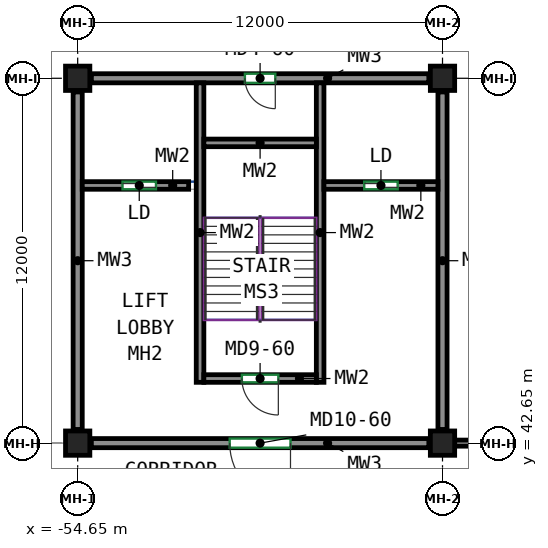
"""IFC4 building model, lengths in metres.
Left out: names, types, materials, properties, quantities, classifications, styles, units other than length and angle.
Written with IfcOpenShell. Run it as: python <this file> out.ifc"""

import sys

from ifc_helpers import new_model, si_unit, direction, frame, frame_2d, origin, origin_2d, place, context, subcontext, project, spatial, rectangle, extrude, source, transform, mapped, element, fill, save


model = new_model("IFC4")
c1 = context("Model", 3, precision=1e-05, world=origin(), true_north=direction((0.0, 1.0)))
c2 = subcontext(c1, "Body", "Model", "MODEL_VIEW")
j1 = project(units=[si_unit("LENGTHUNIT", "METRE"), si_unit("PLANEANGLEUNIT", "RADIAN")], contexts=[c1])
p1 = place(None, origin())
s1 = spatial("IfcSite", under=j1, at=p1, CompositionType="ELEMENT")
p2 = place(p1, origin())
s2 = spatial("IfcBuilding", under=s1, at=p2, CompositionType="ELEMENT")
p3 = place(p2, frame((0.0, 0.0, 9.0)))
s3 = spatial("IfcBuildingStorey", under=s2, at=p3, CompositionType="ELEMENT", Elevation=9.0)
m1 = source(origin(), c2, "Body", "SweptSolid", [
    extrude(rectangle(XDim=0.8, YDim=0.8, at=origin_2d()), origin(), (0.0, 0.0, 1.0), 4.1),
])
for number, where, z_axis, x_axis in (
    (1, (-54.65, 42.65, 0.0), (0.0, 0.0, 1.0), (1.0, 0.0, 0.0)),
    (2, (-54.65, 54.65, 0.0), (0.0, 0.0, 1.0), (1.0, 0.0, 0.0)),
    (3, (-42.65, 42.65, 0.0), (0.0, 0.0, 1.0), (1.0, 0.0, 0.0)),
    (4, (-42.65, 54.65, 0.0), (0.0, 0.0, 1.0), (1.0, 0.0, 0.0)),
):
    element("IfcColumn", number, at=place(p3, frame(where, z_axis=z_axis, x_axis=x_axis)), inside=s3, PredefinedType="COLUMN", context=c2, shape_type="MappedRepresentation", body=[
        mapped(m1, transform((0.0, 0.0, 0.0))),
    ])
m2 = source(origin(), c2, "Body", "SweptSolid", [
    extrude(rectangle(XDim=11.1, YDim=0.3, at=frame_2d((5.55, 0.0))), origin(), (0.0, 0.0, 1.0), 3.2),
])
p4 = place(p3, frame((-43.1, 54.65, 0.0), z_axis=(0.0, 0.0, 1.0), x_axis=(-1.0, 0.0, 0.0)))
e5 = element("IfcWall", 5, at=p4, inside=s3, PredefinedType="SHEAR", context=c2, shape_type="MappedRepresentation", body=[
    mapped(m2, transform((0.0, 0.0, 0.0))),
])
p5 = place(p4, frame((5.05, 0.0, 0.0)))
e6 = element("IfcOpeningElement", 6, at=p5, cuts=e5, PredefinedType="OPENING", context=c2, shape_type="SweptSolid", body=[
    extrude(rectangle(XDim=1.0, YDim=2.1, at=frame_2d((0.5, 1.05))), frame((0.0, 0.16, 0.0), z_axis=(0.0, -1.0, 0.0), x_axis=(1.0, 0.0, 0.0)), (0.0, 0.0, 1.0), 0.32),
])
p6 = place(p3, frame((-43.1, 42.65, 0.0), z_axis=(0.0, 0.0, 1.0), x_axis=(-1.0, 0.0, 0.0)))
e7 = element("IfcWall", 7, at=p6, inside=s3, PredefinedType="SHEAR", context=c2, shape_type="MappedRepresentation", body=[
    mapped(m2, transform((0.0, 0.0, 0.0))),
])
p7 = place(p6, frame((4.55, 0.0, 0.0)))
e8 = element("IfcOpeningElement", 8, at=p7, cuts=e7, PredefinedType="OPENING", context=c2, shape_type="SweptSolid", body=[
    extrude(rectangle(XDim=2.0, YDim=2.4, at=frame_2d((1.0, 1.2))), frame((0.0, 0.16, 0.0), z_axis=(0.0, -1.0, 0.0), x_axis=(1.0, 0.0, 0.0)), (0.0, 0.0, 1.0), 0.32),
])
for number, where, z_axis, x_axis in (
    (9, (-42.65, 54.2, 0.0), (0.0, 0.0, 1.0), (0.0, -1.0, 0.0)),
    (10, (-54.65, 54.2, 0.0), (0.0, 0.0, 1.0), (0.0, -1.0, 0.0)),
):
    element("IfcWall", number, at=place(p3, frame(where, z_axis=z_axis, x_axis=x_axis)), inside=s3, PredefinedType="SHEAR", context=c2, shape_type="MappedRepresentation", body=[
        mapped(m2, transform((0.0, 0.0, 0.0))),
    ])
m3 = source(origin(), c2, "Body", "SweptSolid", [
    extrude(rectangle(XDim=9.85, YDim=0.25, at=frame_2d((4.925, 0.0))), origin(), (0.0, 0.0, 1.0), 4.1),
])
for number, where, z_axis, x_axis in (
    (11, (-46.675, 54.5, 0.0), (0.0, 0.0, 1.0), (0.0, -1.0, 0.0)),
    (12, (-50.625, 54.5, 0.0), (0.0, 0.0, 1.0), (0.0, -1.0, 0.0)),
):
    element("IfcWall", number, at=place(p3, frame(where, z_axis=z_axis, x_axis=x_axis)), inside=s3, PredefinedType="SHEAR", context=c2, shape_type="MappedRepresentation", body=[
        mapped(m3, transform((0.0, 0.0, 0.0))),
    ])
m4 = source(origin(), c2, "Body", "SweptSolid", [
    extrude(rectangle(XDim=3.7, YDim=0.25, at=frame_2d((1.85, 0.0))), origin(), (0.0, 0.0, 1.0), 4.1),
])
p8 = place(p3, frame((-46.8, 52.525, 0.0), z_axis=(0.0, 0.0, 1.0), x_axis=(-1.0, 0.0, 0.0)))
e13 = element("IfcWall", 13, at=p8, inside=s3, PredefinedType="SHEAR", context=c2, shape_type="MappedRepresentation", body=[
    mapped(m4, transform((0.0, 0.0, 0.0))),
])
p9 = place(p3, frame((-46.8, 44.775, 0.0), z_axis=(0.0, 0.0, 1.0), x_axis=(-1.0, 0.0, 0.0)))
e14 = element("IfcWall", 14, at=p9, inside=s3, PredefinedType="SHEAR", context=c2, shape_type="MappedRepresentation", body=[
    mapped(m4, transform((0.0, 0.0, 0.0))),
])
p10 = place(p9, frame((1.25, 0.0, 0.0)))
e15 = element("IfcOpeningElement", 15, at=p10, cuts=e14, PredefinedType="OPENING", context=c2, shape_type="SweptSolid", body=[
    extrude(rectangle(XDim=1.2, YDim=2.1, at=frame_2d((0.6, 1.05))), frame((0.0, 0.135, 0.0), z_axis=(0.0, -1.0, 0.0), x_axis=(1.0, 0.0, 0.0)), (0.0, 0.0, 1.0), 0.27),
])
m5 = source(origin(), c2, "Body", "SweptSolid", [
    extrude(rectangle(XDim=3.75, YDim=0.25, at=frame_2d((1.875, 0.0))), origin(), (0.0, 0.0, 1.0), 4.1),
])
p11 = place(p3, frame((-42.8, 51.125, 0.0), z_axis=(0.0, 0.0, 1.0), x_axis=(-1.0, 0.0, 0.0)))
e16 = element("IfcWall", 16, at=p11, inside=s3, PredefinedType="SHEAR", context=c2, shape_type="MappedRepresentation", body=[
    mapped(m5, transform((0.0, 0.0, 0.0))),
])
p12 = place(p11, frame((1.325, 0.0, 0.0)))
e17 = element("IfcOpeningElement", 17, at=p12, cuts=e16, PredefinedType="OPENING", context=c2, shape_type="SweptSolid", body=[
    extrude(rectangle(XDim=1.1, YDim=2.1, at=frame_2d((0.55, 1.05))), frame((0.0, 0.135, 0.0), z_axis=(0.0, -1.0, 0.0), x_axis=(1.0, 0.0, 0.0)), (0.0, 0.0, 1.0), 0.27),
])
m6 = source(origin(), c2, "Body", "SweptSolid", [
    extrude(rectangle(XDim=3.5, YDim=0.25, at=frame_2d((1.75, 0.0))), origin(), (0.0, 0.0, 1.0), 4.1),
])
p13 = place(p3, frame((-51.0, 51.125, 0.0), z_axis=(0.0, 0.0, 1.0), x_axis=(-1.0, 0.0, 0.0)))
e18 = element("IfcWall", 18, at=p13, inside=s3, PredefinedType="SHEAR", context=c2, shape_type="MappedRepresentation", body=[
    mapped(m6, transform((0.0, 0.0, 0.0))),
])
p14 = place(p13, frame((1.075, 0.0, 0.0)))
e19 = element("IfcOpeningElement", 19, at=p14, cuts=e18, PredefinedType="OPENING", context=c2, shape_type="SweptSolid", body=[
    extrude(rectangle(XDim=1.1, YDim=2.1, at=frame_2d((0.55, 1.05))), frame((0.0, 0.135, 0.0), z_axis=(0.0, -1.0, 0.0), x_axis=(1.0, 0.0, 0.0)), (0.0, 0.0, 1.0), 0.27),
])
m7 = source(origin(), c2, "Body", "SweptSolid", [
    extrude(rectangle(XDim=1.8, YDim=0.2, at=frame_2d((0.9, 0.0))), origin(), (0.0, 0.0, 1.0), 4.1),
])
p15 = place(p3, frame((-56.85, 42.65, 0.0), z_axis=(0.0, 0.0, 1.0), x_axis=(1.0, 0.0, 0.0)))
e20 = element("IfcWall", 20, at=p15, inside=s3, PredefinedType="PARTITIONING", context=c2, shape_type="MappedRepresentation", body=[
    mapped(m7, transform((0.0, 0.0, 0.0))),
])
m8 = source(origin(), c2, "Body", "SweptSolid", [
    extrude(rectangle(XDim=11.2, YDim=0.2, at=frame_2d((5.6, 0.0))), origin(), (0.0, 0.0, 1.0), 3.2),
])
p16 = place(p3, frame((-42.25, 42.65, 0.0), z_axis=(0.0, 0.0, 1.0), x_axis=(1.0, 0.0, 0.0)))
e21 = element("IfcWall", 21, at=p16, inside=s3, PredefinedType="PARTITIONING", context=c2, shape_type="MappedRepresentation", body=[
    mapped(m8, transform((0.0, 0.0, 0.0))),
])
p17 = place(p16, frame((5.0, 0.0, 0.0)))
e22 = element("IfcOpeningElement", 22, at=p17, cuts=e21, PredefinedType="OPENING", context=c2, shape_type="SweptSolid", body=[
    extrude(rectangle(XDim=1.2, YDim=2.1, at=frame_2d((0.6, 1.05))), frame((0.0, 0.11, 0.0), z_axis=(0.0, -1.0, 0.0), x_axis=(1.0, 0.0, 0.0)), (0.0, 0.0, 1.0), 0.22),
])
p18 = place(p10, origin())
e23 = element("IfcDoor", 23, at=p18, inside=s3, OperationType="DOUBLE_DOOR_SINGLE_SWING", PredefinedType="DOOR", context=c2, shape_type="SweptSolid", body=[
    extrude(rectangle(XDim=1.2, YDim=2.1, at=frame_2d((0.6, 1.05))), frame((0.0, 0.025, 0.0), z_axis=(0.0, -1.0, 0.0), x_axis=(1.0, 0.0, 0.0)), (0.0, 0.0, 1.0), 0.05),
])
fill(e15, e23)
p19 = place(p7, origin())
e24 = element("IfcDoor", 24, at=p19, inside=s3, OperationType="DOUBLE_DOOR_SINGLE_SWING", PredefinedType="DOOR", context=c2, shape_type="SweptSolid", body=[
    extrude(rectangle(XDim=2.0, YDim=2.4, at=frame_2d((1.0, 1.2))), frame((0.0, 0.025, 0.0), z_axis=(0.0, -1.0, 0.0), x_axis=(1.0, 0.0, 0.0)), (0.0, 0.0, 1.0), 0.05),
])
fill(e8, e24)
p20 = place(p12, origin())
e25 = element("IfcDoor", 25, at=p20, inside=s3, OperationType="SLIDING_TO_LEFT", PredefinedType="DOOR", context=c2, shape_type="SweptSolid", body=[
    extrude(rectangle(XDim=1.1, YDim=2.1, at=frame_2d((0.55, 1.05))), frame((0.0, 0.025, 0.0), z_axis=(0.0, -1.0, 0.0), x_axis=(1.0, 0.0, 0.0)), (0.0, 0.0, 1.0), 0.05),
])
fill(e17, e25)
p21 = place(p14, origin())
e26 = element("IfcDoor", 26, at=p21, inside=s3, OperationType="SLIDING_TO_LEFT", PredefinedType="DOOR", context=c2, shape_type="SweptSolid", body=[
    extrude(rectangle(XDim=1.1, YDim=2.1, at=frame_2d((0.55, 1.05))), frame((0.0, 0.025, 0.0), z_axis=(0.0, -1.0, 0.0), x_axis=(1.0, 0.0, 0.0)), (0.0, 0.0, 1.0), 0.05),
])
fill(e19, e26)
p22 = place(p5, origin())
e27 = element("IfcDoor", 27, at=p22, inside=s3, OperationType="SINGLE_SWING_LEFT", PredefinedType="DOOR", context=c2, shape_type="SweptSolid", body=[
    extrude(rectangle(XDim=1.0, YDim=2.1, at=frame_2d((0.5, 1.05))), frame((0.0, 0.025, 0.0), z_axis=(0.0, -1.0, 0.0), x_axis=(1.0, 0.0, 0.0)), (0.0, 0.0, 1.0), 0.05),
])
fill(e6, e27)
save(model, sys.argv[1])
